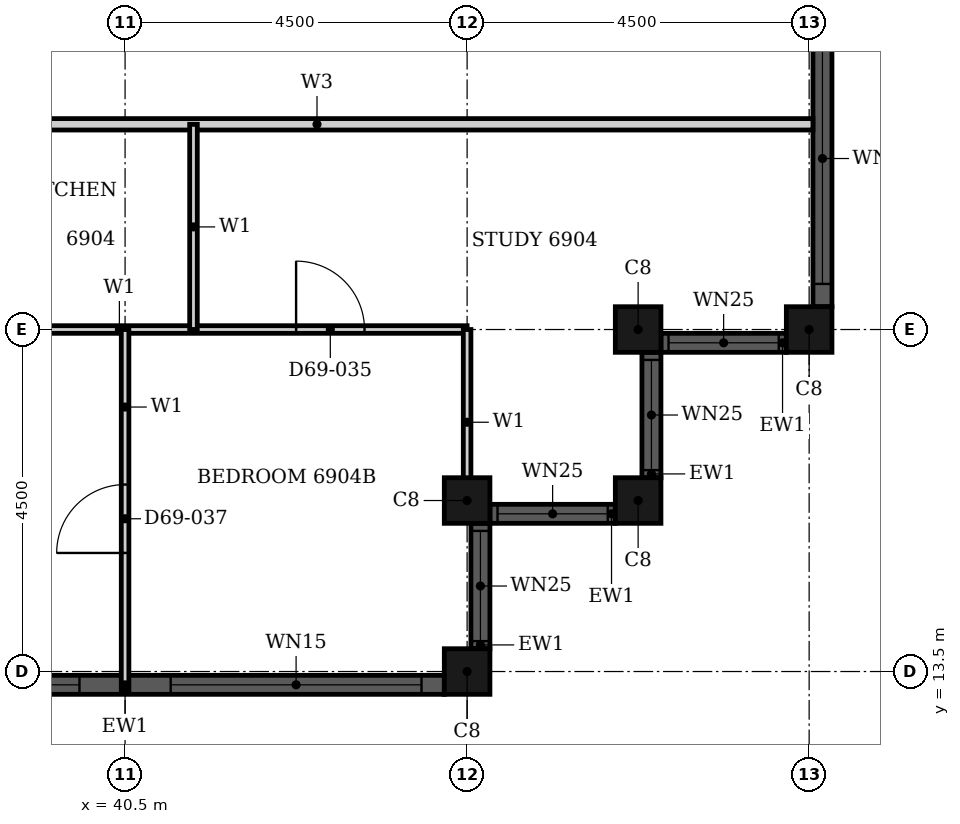
"""IFC4 building model, lengths in metres.
Left out: names, types, materials, properties, quantities, classifications, styles, units other than length and angle.
Written with IfcOpenShell. Run it as: python <this file> out.ifc"""

import sys

from ifc_helpers import new_model, si_unit, direction, frame, frame_2d, origin, origin_2d, place, context, subcontext, project, spatial, rectangle, hollow_rectangle, extrude, element, fill, save


model = new_model("IFC4")
c1 = context("Model", 3, precision=1e-05, world=origin(), true_north=direction((0.0, 1.0)))
c2 = subcontext(c1, "Body", "Model", "MODEL_VIEW")
j1 = project(units=[si_unit("LENGTHUNIT", "METRE"), si_unit("PLANEANGLEUNIT", "RADIAN")], contexts=[c1])
p1 = place(None, origin())
s1 = spatial("IfcSite", under=j1, at=p1, CompositionType="ELEMENT")
p2 = place(p1, origin())
s2 = spatial("IfcBuilding", under=s1, at=p2, CompositionType="ELEMENT")
p3 = place(p2, frame((0.0, 0.0, 271.2)))
s3 = spatial("IfcBuildingStorey", under=s2, at=p3, CompositionType="ELEMENT", Elevation=271.2)
for number, where, z_axis, x_axis in (
    (1, (45.0, 13.5, 0.0), (0.0, 0.0, 1.0), (1.0, 0.0, 0.0)),
    (2, (45.0, 15.75, 0.0), (0.0, 0.0, 1.0), (1.0, 0.0, 0.0)),
    (3, (47.25, 15.75, 0.0), (0.0, 0.0, 1.0), (1.0, 0.0, 0.0)),
    (4, (47.25, 18.0, 0.0), (0.0, 0.0, 1.0), (1.0, 0.0, 0.0)),
    (5, (49.5, 18.0, 0.0), (0.0, 0.0, 1.0), (1.0, 0.0, 0.0)),
):
    element("IfcColumn", number, at=place(p3, frame(where, z_axis=z_axis, x_axis=x_axis)), inside=s3, PredefinedType="COLUMN", context=c2, shape_type="SweptSolid", body=[
        extrude(hollow_rectangle(XDim=0.6, YDim=0.6, WallThickness=0.02, at=origin_2d()), origin(), (0.0, 0.0, 1.0), 3.7),
    ])
p4 = place(p3, frame((36.3, 13.325, 0.0), z_axis=(0.0, 0.0, 1.0), x_axis=(1.0, 0.0, 0.0)))
e6 = element("IfcWall", 6, at=p4, inside=s3, PredefinedType="SOLIDWALL", context=c2, shape_type="SweptSolid", body=[
    extrude(rectangle(XDim=8.4, YDim=0.25, at=frame_2d((4.2, 0.0))), origin(), (0.0, 0.0, 1.0), 3.7),
])
p5 = place(p4, frame((0.3, 0.0, 0.45)))
e7 = element("IfcOpeningElement", 7, at=p5, cuts=e6, PredefinedType="OPENING", context=c2, shape_type="SweptSolid", body=[
    extrude(rectangle(XDim=3.3, YDim=2.3, at=frame_2d((1.65, 1.15))), frame((0.0, 0.135, 0.0), z_axis=(0.0, -1.0, 0.0), x_axis=(1.0, 0.0, 0.0)), (0.0, 0.0, 1.0), 0.27),
])
p6 = place(p4, frame((4.8, 0.0, 0.45)))
e8 = element("IfcOpeningElement", 8, at=p6, cuts=e6, PredefinedType="OPENING", context=c2, shape_type="SweptSolid", body=[
    extrude(rectangle(XDim=3.3, YDim=2.3, at=frame_2d((1.65, 1.15))), frame((0.0, 0.135, 0.0), z_axis=(0.0, -1.0, 0.0), x_axis=(1.0, 0.0, 0.0)), (0.0, 0.0, 1.0), 0.27),
])
p7 = place(p3, frame((45.175, 13.8, 0.0), z_axis=(0.0, 0.0, 1.0), x_axis=(0.0, 1.0, 0.0)))
e9 = element("IfcWall", 9, at=p7, inside=s3, PredefinedType="SOLIDWALL", context=c2, shape_type="SweptSolid", body=[
    extrude(rectangle(XDim=1.65, YDim=0.25, at=frame_2d((0.825, 0.0))), origin(), (0.0, 0.0, 1.0), 3.7),
])
p8 = place(p7, frame((0.1, 0.0, 0.9)))
e10 = element("IfcOpeningElement", 10, at=p8, cuts=e9, PredefinedType="OPENING", context=c2, shape_type="SweptSolid", body=[
    extrude(rectangle(XDim=1.45, YDim=1.85, at=frame_2d((0.725, 0.925))), frame((0.0, 0.135, 0.0), z_axis=(0.0, -1.0, 0.0), x_axis=(1.0, 0.0, 0.0)), (0.0, 0.0, 1.0), 0.27),
])
p9 = place(p3, frame((45.3, 15.575, 0.0), z_axis=(0.0, 0.0, 1.0), x_axis=(1.0, 0.0, 0.0)))
e11 = element("IfcWall", 11, at=p9, inside=s3, PredefinedType="SOLIDWALL", context=c2, shape_type="SweptSolid", body=[
    extrude(rectangle(XDim=1.65, YDim=0.25, at=frame_2d((0.825, 0.0))), origin(), (0.0, 0.0, 1.0), 3.7),
])
p10 = place(p9, frame((0.1, 0.0, 0.9)))
e12 = element("IfcOpeningElement", 12, at=p10, cuts=e11, PredefinedType="OPENING", context=c2, shape_type="SweptSolid", body=[
    extrude(rectangle(XDim=1.45, YDim=1.85, at=frame_2d((0.725, 0.925))), frame((0.0, 0.135, 0.0), z_axis=(0.0, -1.0, 0.0), x_axis=(1.0, 0.0, 0.0)), (0.0, 0.0, 1.0), 0.27),
])
p11 = place(p3, frame((47.425, 16.05, 0.0), z_axis=(0.0, 0.0, 1.0), x_axis=(0.0, 1.0, 0.0)))
e13 = element("IfcWall", 13, at=p11, inside=s3, PredefinedType="SOLIDWALL", context=c2, shape_type="SweptSolid", body=[
    extrude(rectangle(XDim=1.65, YDim=0.25, at=frame_2d((0.825, 0.0))), origin(), (0.0, 0.0, 1.0), 3.7),
])
p12 = place(p11, frame((0.1, 0.0, 0.9)))
e14 = element("IfcOpeningElement", 14, at=p12, cuts=e13, PredefinedType="OPENING", context=c2, shape_type="SweptSolid", body=[
    extrude(rectangle(XDim=1.45, YDim=1.85, at=frame_2d((0.725, 0.925))), frame((0.0, 0.135, 0.0), z_axis=(0.0, -1.0, 0.0), x_axis=(1.0, 0.0, 0.0)), (0.0, 0.0, 1.0), 0.27),
])
p13 = place(p3, frame((47.55, 17.825, 0.0), z_axis=(0.0, 0.0, 1.0), x_axis=(1.0, 0.0, 0.0)))
e15 = element("IfcWall", 15, at=p13, inside=s3, PredefinedType="SOLIDWALL", context=c2, shape_type="SweptSolid", body=[
    extrude(rectangle(XDim=1.65, YDim=0.25, at=frame_2d((0.825, 0.0))), origin(), (0.0, 0.0, 1.0), 3.7),
])
p14 = place(p13, frame((0.1, 0.0, 0.9)))
e16 = element("IfcOpeningElement", 16, at=p14, cuts=e15, PredefinedType="OPENING", context=c2, shape_type="SweptSolid", body=[
    extrude(rectangle(XDim=1.45, YDim=1.85, at=frame_2d((0.725, 0.925))), frame((0.0, 0.135, 0.0), z_axis=(0.0, -1.0, 0.0), x_axis=(1.0, 0.0, 0.0)), (0.0, 0.0, 1.0), 0.27),
])
p15 = place(p3, frame((49.675, 18.3, 0.0), z_axis=(0.0, 0.0, 1.0), x_axis=(0.0, 1.0, 0.0)))
e17 = element("IfcWall", 17, at=p15, inside=s3, PredefinedType="SOLIDWALL", context=c2, shape_type="SweptSolid", body=[
    extrude(rectangle(XDim=8.4, YDim=0.25, at=frame_2d((4.2, 0.0))), origin(), (0.0, 0.0, 1.0), 3.7),
])
p16 = place(p15, frame((0.3, 0.0, 0.45)))
e18 = element("IfcOpeningElement", 18, at=p16, cuts=e17, PredefinedType="OPENING", context=c2, shape_type="SweptSolid", body=[
    extrude(rectangle(XDim=3.3, YDim=2.3, at=frame_2d((1.65, 1.15))), frame((0.0, 0.135, 0.0), z_axis=(0.0, -1.0, 0.0), x_axis=(1.0, 0.0, 0.0)), (0.0, 0.0, 1.0), 0.27),
])
p17 = place(p15, frame((4.8, 0.0, 0.45)))
e19 = element("IfcOpeningElement", 19, at=p17, cuts=e17, PredefinedType="OPENING", context=c2, shape_type="SweptSolid", body=[
    extrude(rectangle(XDim=3.3, YDim=2.3, at=frame_2d((1.65, 1.15))), frame((0.0, 0.135, 0.0), z_axis=(0.0, -1.0, 0.0), x_axis=(1.0, 0.0, 0.0)), (0.0, 0.0, 1.0), 0.27),
])
p18 = place(p3, frame((33.9, 20.7, 0.0), z_axis=(0.0, 0.0, 1.0), x_axis=(1.0, 0.0, 0.0)))
e20 = element("IfcWall", 20, at=p18, inside=s3, PredefinedType="PARTITIONING", context=c2, shape_type="SweptSolid", body=[
    extrude(rectangle(XDim=15.65, YDim=0.15, at=frame_2d((7.825, 0.0))), origin(), (0.0, 0.0, 1.0), 3.4),
])
p19 = place(p18, frame((1.6, 0.0, 0.0)))
e21 = element("IfcOpeningElement", 21, at=p19, cuts=e20, PredefinedType="OPENING", context=c2, shape_type="SweptSolid", body=[
    extrude(rectangle(XDim=1.0, YDim=2.2, at=frame_2d((0.5, 1.1))), frame((0.0, 0.085, 0.0), z_axis=(0.0, -1.0, 0.0), x_axis=(1.0, 0.0, 0.0)), (0.0, 0.0, 1.0), 0.17),
])
p20 = place(p3, frame((38.1, 18.0, 0.0), z_axis=(0.0, 0.0, 1.0), x_axis=(1.0, 0.0, 0.0)))
e22 = element("IfcWall", 22, at=p20, inside=s3, PredefinedType="PARTITIONING", context=c2, shape_type="SweptSolid", body=[
    extrude(rectangle(XDim=6.9, YDim=0.1, at=frame_2d((3.45, 0.0))), origin(), (0.0, 0.0, 1.0), 3.4),
])
p21 = place(p20, frame((4.65, 0.0, 0.0)))
e23 = element("IfcOpeningElement", 23, at=p21, cuts=e22, PredefinedType="OPENING", context=c2, shape_type="SweptSolid", body=[
    extrude(rectangle(XDim=0.9, YDim=2.1, at=frame_2d((0.45, 1.05))), frame((0.0, 0.06, 0.0), z_axis=(0.0, -1.0, 0.0), x_axis=(1.0, 0.0, 0.0)), (0.0, 0.0, 1.0), 0.12),
])
p22 = place(p3, frame((40.5, 13.26, 0.0), z_axis=(0.0, 0.0, 1.0), x_axis=(0.0, 1.0, 0.0)))
e24 = element("IfcWall", 24, at=p22, inside=s3, PredefinedType="PARTITIONING", context=c2, shape_type="SweptSolid", body=[
    extrude(rectangle(XDim=4.74, YDim=0.1, at=frame_2d((2.37, 0.0))), origin(), (0.0, 0.0, 1.0), 3.4),
])
p23 = place(p22, frame((1.8, 0.0, 0.0)))
e25 = element("IfcOpeningElement", 25, at=p23, cuts=e24, PredefinedType="OPENING", context=c2, shape_type="SweptSolid", body=[
    extrude(rectangle(XDim=0.9, YDim=2.1, at=frame_2d((0.45, 1.05))), frame((0.0, 0.06, 0.0), z_axis=(0.0, -1.0, 0.0), x_axis=(1.0, 0.0, 0.0)), (0.0, 0.0, 1.0), 0.12),
])
p24 = place(p3, frame((41.4, 18.0, 0.0), z_axis=(0.0, 0.0, 1.0), x_axis=(0.0, 1.0, 0.0)))
e26 = element("IfcWall", 26, at=p24, inside=s3, PredefinedType="PARTITIONING", context=c2, shape_type="SweptSolid", body=[
    extrude(rectangle(XDim=2.7, YDim=0.1, at=frame_2d((1.35, 0.0))), origin(), (0.0, 0.0, 1.0), 3.4),
])
p25 = place(p3, frame((45.0, 15.56, 0.0), z_axis=(0.0, 0.0, 1.0), x_axis=(0.0, 1.0, 0.0)))
e27 = element("IfcWall", 27, at=p25, inside=s3, PredefinedType="PARTITIONING", context=c2, shape_type="SweptSolid", body=[
    extrude(rectangle(XDim=2.44, YDim=0.1, at=frame_2d((1.22, 0.0))), origin(), (0.0, 0.0, 1.0), 3.4),
])
p26 = place(p5, origin())
e28 = element("IfcWindow", 28, at=p26, inside=s3, PartitioningType="SINGLE_PANEL", PredefinedType="WINDOW", context=c2, shape_type="SweptSolid", body=[
    extrude(rectangle(XDim=3.3, YDim=2.3, at=frame_2d((1.65, 1.15))), frame((0.0, 0.03, 0.0), z_axis=(0.0, -1.0, 0.0), x_axis=(1.0, 0.0, 0.0)), (0.0, 0.0, 1.0), 0.06),
])
fill(e7, e28)
p27 = place(p6, origin())
e29 = element("IfcWindow", 29, at=p27, inside=s3, PartitioningType="SINGLE_PANEL", PredefinedType="WINDOW", context=c2, shape_type="SweptSolid", body=[
    extrude(rectangle(XDim=3.3, YDim=2.3, at=frame_2d((1.65, 1.15))), frame((0.0, 0.03, 0.0), z_axis=(0.0, -1.0, 0.0), x_axis=(1.0, 0.0, 0.0)), (0.0, 0.0, 1.0), 0.06),
])
fill(e8, e29)
p28 = place(p8, origin())
e30 = element("IfcWindow", 30, at=p28, inside=s3, PartitioningType="SINGLE_PANEL", PredefinedType="WINDOW", context=c2, shape_type="SweptSolid", body=[
    extrude(rectangle(XDim=1.45, YDim=1.85, at=frame_2d((0.725, 0.925))), frame((0.0, 0.03, 0.0), z_axis=(0.0, -1.0, 0.0), x_axis=(1.0, 0.0, 0.0)), (0.0, 0.0, 1.0), 0.06),
])
fill(e10, e30)
p29 = place(p10, origin())
e31 = element("IfcWindow", 31, at=p29, inside=s3, PartitioningType="SINGLE_PANEL", PredefinedType="WINDOW", context=c2, shape_type="SweptSolid", body=[
    extrude(rectangle(XDim=1.45, YDim=1.85, at=frame_2d((0.725, 0.925))), frame((0.0, 0.03, 0.0), z_axis=(0.0, -1.0, 0.0), x_axis=(1.0, 0.0, 0.0)), (0.0, 0.0, 1.0), 0.06),
])
fill(e12, e31)
p30 = place(p12, origin())
e32 = element("IfcWindow", 32, at=p30, inside=s3, PartitioningType="SINGLE_PANEL", PredefinedType="WINDOW", context=c2, shape_type="SweptSolid", body=[
    extrude(rectangle(XDim=1.45, YDim=1.85, at=frame_2d((0.725, 0.925))), frame((0.0, 0.03, 0.0), z_axis=(0.0, -1.0, 0.0), x_axis=(1.0, 0.0, 0.0)), (0.0, 0.0, 1.0), 0.06),
])
fill(e14, e32)
p31 = place(p14, origin())
e33 = element("IfcWindow", 33, at=p31, inside=s3, PartitioningType="SINGLE_PANEL", PredefinedType="WINDOW", context=c2, shape_type="SweptSolid", body=[
    extrude(rectangle(XDim=1.45, YDim=1.85, at=frame_2d((0.725, 0.925))), frame((0.0, 0.03, 0.0), z_axis=(0.0, -1.0, 0.0), x_axis=(1.0, 0.0, 0.0)), (0.0, 0.0, 1.0), 0.06),
])
fill(e16, e33)
p32 = place(p16, origin())
e34 = element("IfcWindow", 34, at=p32, inside=s3, PartitioningType="SINGLE_PANEL", PredefinedType="WINDOW", context=c2, shape_type="SweptSolid", body=[
    extrude(rectangle(XDim=3.3, YDim=2.3, at=frame_2d((1.65, 1.15))), frame((0.0, 0.03, 0.0), z_axis=(0.0, -1.0, 0.0), x_axis=(1.0, 0.0, 0.0)), (0.0, 0.0, 1.0), 0.06),
])
fill(e18, e34)
p33 = place(p21, origin())
e35 = element("IfcDoor", 35, at=p33, inside=s3, OperationType="SINGLE_SWING_RIGHT", PredefinedType="DOOR", context=c2, shape_type="SweptSolid", body=[
    extrude(rectangle(XDim=0.9, YDim=2.1, at=frame_2d((0.45, 1.05))), frame((0.0, 0.025, 0.0), z_axis=(0.0, -1.0, 0.0), x_axis=(1.0, 0.0, 0.0)), (0.0, 0.0, 1.0), 0.05),
])
fill(e23, e35)
p34 = place(p23, origin())
e36 = element("IfcDoor", 36, at=p34, inside=s3, OperationType="SINGLE_SWING_RIGHT", PredefinedType="DOOR", context=c2, shape_type="SweptSolid", body=[
    extrude(rectangle(XDim=0.9, YDim=2.1, at=frame_2d((0.45, 1.05))), frame((0.0, 0.025, 0.0), z_axis=(0.0, -1.0, 0.0), x_axis=(1.0, 0.0, 0.0)), (0.0, 0.0, 1.0), 0.05),
])
fill(e25, e36)
save(model, sys.argv[1])
